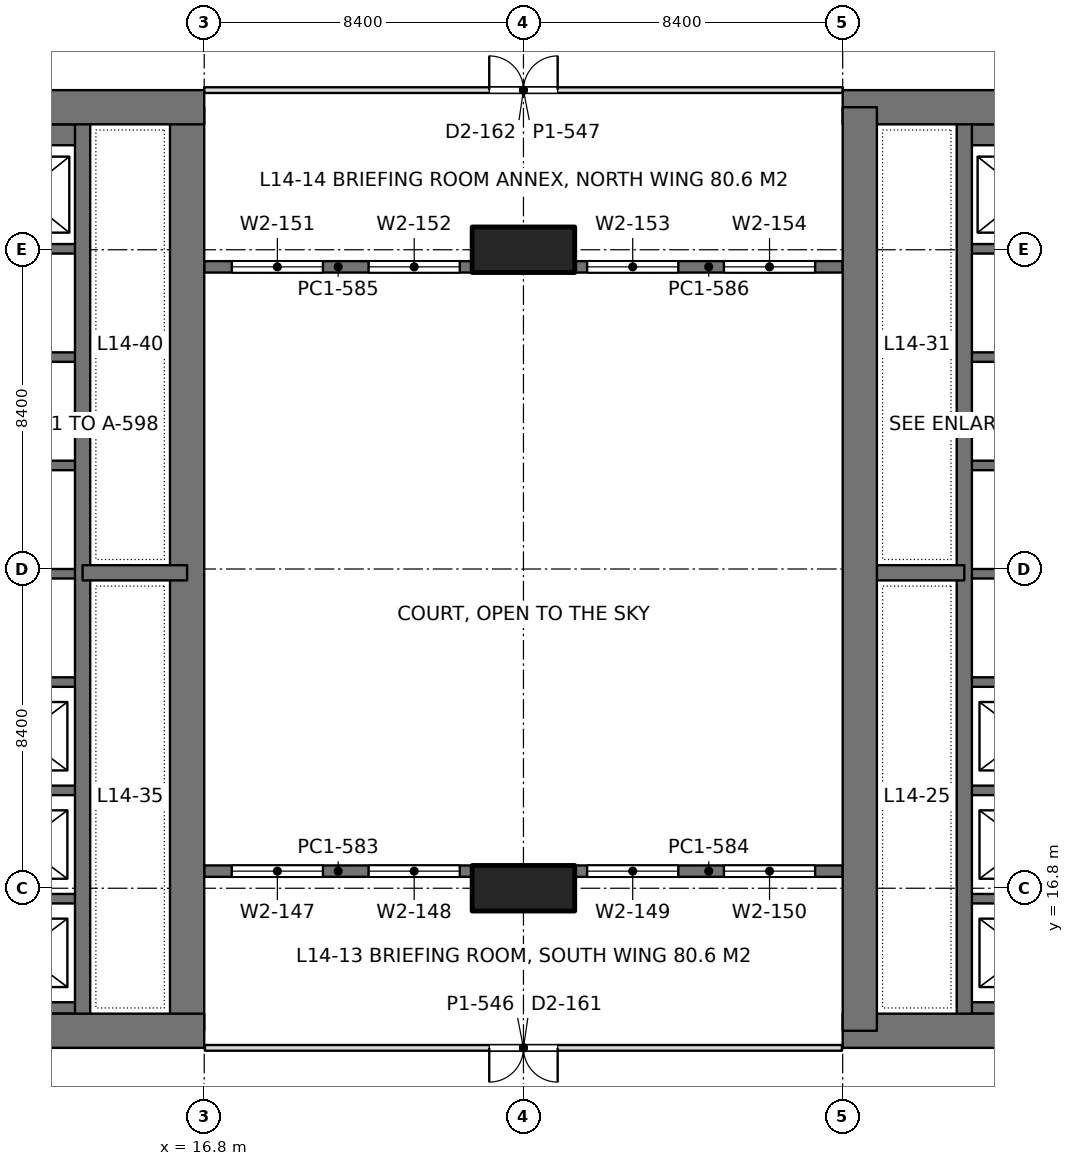
"""IFC4 building model, lengths in metres.
Left out: names, types, materials, properties, quantities, classifications, styles, units other than length and angle.
Written with IfcOpenShell. Run it as: python <this file> out.ifc"""

import sys

from ifc_helpers import new_model, si_unit, direction, frame, frame_2d, origin, origin_2d, place, context, subcontext, project, spatial, rectangle, extrude, element, fill, save


model = new_model("IFC4")
c1 = context("Model", 3, precision=1e-05, world=origin(), true_north=direction((0.0, 1.0)))
c2 = subcontext(c1, "Body", "Model", "MODEL_VIEW")
j1 = project(units=[si_unit("LENGTHUNIT", "METRE"), si_unit("PLANEANGLEUNIT", "RADIAN")], contexts=[c1])
p1 = place(None, origin())
s1 = spatial("IfcSite", under=j1, at=p1, CompositionType="ELEMENT")
p2 = place(p1, origin())
s2 = spatial("IfcBuilding", under=s1, at=p2, CompositionType="ELEMENT")
p3 = place(p2, frame((0.0, 0.0, 63.9)))
s3 = spatial("IfcBuildingStorey", under=s2, at=p3, CompositionType="ELEMENT", Elevation=63.9)
for number, where, z_axis, x_axis in (
    (1, (25.2, 16.8, 0.0), (0.0, 0.0, 1.0), (1.0, 0.0, 0.0)),
    (2, (25.2, 33.6, 0.0), (0.0, 0.0, 1.0), (1.0, 0.0, 0.0)),
):
    element("IfcColumn", number, at=place(p3, frame(where, z_axis=z_axis, x_axis=x_axis)), inside=s3, PredefinedType="COLUMN", context=c2, shape_type="SweptSolid", body=[
        extrude(rectangle(XDim=2.7, YDim=1.2, at=origin_2d()), origin(), (0.0, 0.0, 1.0), 4.5),
    ])
p4 = place(p3, frame((-1.2, 13.05, 0.0), z_axis=(0.0, 0.0, 1.0), x_axis=(1.0, 0.0, 0.0)))
e3 = element("IfcWall", 3, at=p4, inside=s3, PredefinedType="SHEAR", context=c2, shape_type="SweptSolid", body=[
    extrude(rectangle(XDim=18.0, YDim=0.9, at=frame_2d((9.0, 0.0))), origin(), (0.0, 0.0, 1.0), 4.5),
])
p5 = place(p4, frame((8.95, 0.0, 0.0)))
e4 = element("IfcOpeningElement", 4, at=p5, cuts=e3, PredefinedType="OPENING", context=c2, shape_type="SweptSolid", body=[
    extrude(rectangle(XDim=1.8, YDim=2.4, at=frame_2d((0.9, 1.2))), frame((0.0, 0.46, 0.0), z_axis=(0.0, -1.0, 0.0), x_axis=(1.0, 0.0, 0.0)), (0.0, 0.0, 1.0), 0.92),
])
p6 = place(p3, frame((-1.2, 37.35, 0.0), z_axis=(0.0, 0.0, 1.0), x_axis=(1.0, 0.0, 0.0)))
e5 = element("IfcWall", 5, at=p6, inside=s3, PredefinedType="SHEAR", context=c2, shape_type="SweptSolid", body=[
    extrude(rectangle(XDim=18.0, YDim=0.9, at=frame_2d((9.0, 0.0))), origin(), (0.0, 0.0, 1.0), 4.5),
])
p7 = place(p6, frame((8.95, 0.0, 0.0)))
e6 = element("IfcOpeningElement", 6, at=p7, cuts=e5, PredefinedType="OPENING", context=c2, shape_type="SweptSolid", body=[
    extrude(rectangle(XDim=1.8, YDim=2.4, at=frame_2d((0.9, 1.2))), frame((0.0, 0.46, 0.0), z_axis=(0.0, -1.0, 0.0), x_axis=(1.0, 0.0, 0.0)), (0.0, 0.0, 1.0), 0.92),
])
p8 = place(p3, frame((16.35, 13.05, 0.0), z_axis=(0.0, 0.0, 1.0), x_axis=(0.0, 1.0, 0.0)))
e7 = element("IfcWall", 7, at=p8, inside=s3, PredefinedType="SHEAR", context=c2, shape_type="SweptSolid", body=[
    extrude(rectangle(XDim=24.3, YDim=0.9, at=frame_2d((12.15, 0.0))), origin(), (0.0, 0.0, 1.0), 4.5),
])
p9 = place(p3, frame((13.6, 13.05, 0.0), z_axis=(0.0, 0.0, 1.0), x_axis=(0.0, 1.0, 0.0)))
e8 = element("IfcWall", 8, at=p9, inside=s3, PredefinedType="SHEAR", context=c2, shape_type="SweptSolid", body=[
    extrude(rectangle(XDim=24.3, YDim=0.4, at=frame_2d((12.15, 0.0))), origin(), (0.0, 0.0, 1.0), 4.5),
])
p10 = place(p3, frame((13.6, 25.1, 0.0), z_axis=(0.0, 0.0, 1.0), x_axis=(1.0, 0.0, 0.0)))
e9 = element("IfcWall", 9, at=p10, inside=s3, PredefinedType="SHEAR", context=c2, shape_type="SweptSolid", body=[
    extrude(rectangle(XDim=2.75, YDim=0.4, at=frame_2d((1.375, 0.0))), origin(), (0.0, 0.0, 1.0), 4.5),
])
p11 = place(p3, frame((10.4, 13.65, 0.0), z_axis=(0.0, 0.0, 1.0), x_axis=(1.0, 0.0, 0.0)))
e10 = element("IfcWall", 10, at=p11, inside=s3, PredefinedType="SHEAR", context=c2, shape_type="SweptSolid", body=[
    extrude(rectangle(XDim=3.2, YDim=0.3, at=frame_2d((1.6, 0.0))), origin(), (0.0, 0.0, 1.0), 4.5),
])
for number, where, z_axis, x_axis in (
    (11, (10.4, 16.525, 0.0), (0.0, 0.0, 1.0), (1.0, 0.0, 0.0)),
    (12, (10.4, 19.375, 0.0), (0.0, 0.0, 1.0), (1.0, 0.0, 0.0)),
    (13, (10.4, 22.225, 0.0), (0.0, 0.0, 1.0), (1.0, 0.0, 0.0)),
    (14, (10.4, 25.075, 0.0), (0.0, 0.0, 1.0), (1.0, 0.0, 0.0)),
    (15, (10.4, 27.925, 0.0), (0.0, 0.0, 1.0), (1.0, 0.0, 0.0)),
    (16, (10.4, 30.775, 0.0), (0.0, 0.0, 1.0), (1.0, 0.0, 0.0)),
    (17, (10.4, 33.625, 0.0), (0.0, 0.0, 1.0), (1.0, 0.0, 0.0)),
):
    element("IfcWall", number, at=place(p3, frame(where, z_axis=z_axis, x_axis=x_axis)), inside=s3, PredefinedType="SHEAR", context=c2, shape_type="SweptSolid", body=[
        extrude(rectangle(XDim=3.2, YDim=0.25, at=frame_2d((1.6, 0.0))), origin(), (0.0, 0.0, 1.0), 4.5),
    ])
p12 = place(p3, frame((10.4, 36.625, 0.0), z_axis=(0.0, 0.0, 1.0), x_axis=(1.0, 0.0, 0.0)))
e18 = element("IfcWall", 18, at=p12, inside=s3, PredefinedType="SHEAR", context=c2, shape_type="SweptSolid", body=[
    extrude(rectangle(XDim=3.2, YDim=0.55, at=frame_2d((1.6, 0.0))), origin(), (0.0, 0.0, 1.0), 4.5),
])
p13 = place(p3, frame((33.6, 13.05, 0.0), z_axis=(0.0, 0.0, 1.0), x_axis=(1.0, 0.0, 0.0)))
e19 = element("IfcWall", 19, at=p13, inside=s3, PredefinedType="SHEAR", context=c2, shape_type="SweptSolid", body=[
    extrude(rectangle(XDim=18.0, YDim=0.9, at=frame_2d((9.0, 0.0))), origin(), (0.0, 0.0, 1.0), 4.5),
])
p14 = place(p13, frame((7.25, 0.0, 0.0)))
e20 = element("IfcOpeningElement", 20, at=p14, cuts=e19, PredefinedType="OPENING", context=c2, shape_type="SweptSolid", body=[
    extrude(rectangle(XDim=1.8, YDim=2.4, at=frame_2d((0.9, 1.2))), frame((0.0, 0.46, 0.0), z_axis=(0.0, -1.0, 0.0), x_axis=(1.0, 0.0, 0.0)), (0.0, 0.0, 1.0), 0.92),
])
p15 = place(p3, frame((33.6, 37.35, 0.0), z_axis=(0.0, 0.0, 1.0), x_axis=(1.0, 0.0, 0.0)))
e21 = element("IfcWall", 21, at=p15, inside=s3, PredefinedType="SHEAR", context=c2, shape_type="SweptSolid", body=[
    extrude(rectangle(XDim=18.0, YDim=0.9, at=frame_2d((9.0, 0.0))), origin(), (0.0, 0.0, 1.0), 4.5),
])
p16 = place(p15, frame((7.25, 0.0, 0.0)))
e22 = element("IfcOpeningElement", 22, at=p16, cuts=e21, PredefinedType="OPENING", context=c2, shape_type="SweptSolid", body=[
    extrude(rectangle(XDim=1.8, YDim=2.4, at=frame_2d((0.9, 1.2))), frame((0.0, 0.46, 0.0), z_axis=(0.0, -1.0, 0.0), x_axis=(1.0, 0.0, 0.0)), (0.0, 0.0, 1.0), 0.92),
])
p17 = place(p3, frame((34.05, 13.05, 0.0), z_axis=(0.0, 0.0, 1.0), x_axis=(0.0, 1.0, 0.0)))
e23 = element("IfcWall", 23, at=p17, inside=s3, PredefinedType="SHEAR", context=c2, shape_type="SweptSolid", body=[
    extrude(rectangle(XDim=24.3, YDim=0.9, at=frame_2d((12.15, 0.0))), origin(), (0.0, 0.0, 1.0), 4.5),
])
p18 = place(p3, frame((36.8, 13.05, 0.0), z_axis=(0.0, 0.0, 1.0), x_axis=(0.0, 1.0, 0.0)))
e24 = element("IfcWall", 24, at=p18, inside=s3, PredefinedType="SHEAR", context=c2, shape_type="SweptSolid", body=[
    extrude(rectangle(XDim=24.3, YDim=0.4, at=frame_2d((12.15, 0.0))), origin(), (0.0, 0.0, 1.0), 4.5),
])
p19 = place(p3, frame((36.8, 25.1, 0.0), z_axis=(0.0, 0.0, 1.0), x_axis=(-1.0, 0.0, 0.0)))
e25 = element("IfcWall", 25, at=p19, inside=s3, PredefinedType="SHEAR", context=c2, shape_type="SweptSolid", body=[
    extrude(rectangle(XDim=2.75, YDim=0.4, at=frame_2d((1.375, 0.0))), origin(), (0.0, 0.0, 1.0), 4.5),
])
p20 = place(p3, frame((40.0, 13.65, 0.0), z_axis=(0.0, 0.0, 1.0), x_axis=(-1.0, 0.0, 0.0)))
e26 = element("IfcWall", 26, at=p20, inside=s3, PredefinedType="SHEAR", context=c2, shape_type="SweptSolid", body=[
    extrude(rectangle(XDim=3.2, YDim=0.3, at=frame_2d((1.6, 0.0))), origin(), (0.0, 0.0, 1.0), 4.5),
])
for number, where, z_axis, x_axis in (
    (27, (40.0, 16.525, 0.0), (0.0, 0.0, 1.0), (-1.0, 0.0, 0.0)),
    (28, (40.0, 19.375, 0.0), (0.0, 0.0, 1.0), (-1.0, 0.0, 0.0)),
    (29, (40.0, 22.225, 0.0), (0.0, 0.0, 1.0), (-1.0, 0.0, 0.0)),
    (30, (40.0, 25.075, 0.0), (0.0, 0.0, 1.0), (-1.0, 0.0, 0.0)),
    (31, (40.0, 27.925, 0.0), (0.0, 0.0, 1.0), (-1.0, 0.0, 0.0)),
    (32, (40.0, 30.775, 0.0), (0.0, 0.0, 1.0), (-1.0, 0.0, 0.0)),
    (33, (40.0, 33.625, 0.0), (0.0, 0.0, 1.0), (-1.0, 0.0, 0.0)),
):
    element("IfcWall", number, at=place(p3, frame(where, z_axis=z_axis, x_axis=x_axis)), inside=s3, PredefinedType="SHEAR", context=c2, shape_type="SweptSolid", body=[
        extrude(rectangle(XDim=3.2, YDim=0.25, at=frame_2d((1.6, 0.0))), origin(), (0.0, 0.0, 1.0), 4.5),
    ])
p21 = place(p3, frame((40.0, 36.625, 0.0), z_axis=(0.0, 0.0, 1.0), x_axis=(-1.0, 0.0, 0.0)))
e34 = element("IfcWall", 34, at=p21, inside=s3, PredefinedType="SHEAR", context=c2, shape_type="SweptSolid", body=[
    extrude(rectangle(XDim=3.2, YDim=0.55, at=frame_2d((1.6, 0.0))), origin(), (0.0, 0.0, 1.0), 4.5),
])
p22 = place(p3, frame((16.8, 17.25, 0.0), z_axis=(0.0, 0.0, 1.0), x_axis=(1.0, 0.0, 0.0)))
e35 = element("IfcWall", 35, at=p22, inside=s3, PredefinedType="SOLIDWALL", context=c2, shape_type="SweptSolid", body=[
    extrude(rectangle(XDim=7.05, YDim=0.3, at=frame_2d((3.525, 0.0))), origin(), (0.0, 0.0, 1.0), 4.34),
])
p23 = place(p22, frame((0.725, 0.0, 0.9)))
e36 = element("IfcOpeningElement", 36, at=p23, cuts=e35, PredefinedType="OPENING", context=c2, shape_type="SweptSolid", body=[
    extrude(rectangle(XDim=2.4, YDim=1.9, at=frame_2d((1.2, 0.95))), frame((0.0, 0.16, 0.0), z_axis=(0.0, -1.0, 0.0), x_axis=(1.0, 0.0, 0.0)), (0.0, 0.0, 1.0), 0.32),
])
p24 = place(p22, frame((4.325, 0.0, 0.9)))
e37 = element("IfcOpeningElement", 37, at=p24, cuts=e35, PredefinedType="OPENING", context=c2, shape_type="SweptSolid", body=[
    extrude(rectangle(XDim=2.4, YDim=1.9, at=frame_2d((1.2, 0.95))), frame((0.0, 0.16, 0.0), z_axis=(0.0, -1.0, 0.0), x_axis=(1.0, 0.0, 0.0)), (0.0, 0.0, 1.0), 0.32),
])
p25 = place(p3, frame((26.55, 17.25, 0.0), z_axis=(0.0, 0.0, 1.0), x_axis=(1.0, 0.0, 0.0)))
e38 = element("IfcWall", 38, at=p25, inside=s3, PredefinedType="SOLIDWALL", context=c2, shape_type="SweptSolid", body=[
    extrude(rectangle(XDim=7.05, YDim=0.3, at=frame_2d((3.525, 0.0))), origin(), (0.0, 0.0, 1.0), 4.34),
])
p26 = place(p25, frame((0.325, 0.0, 0.9)))
e39 = element("IfcOpeningElement", 39, at=p26, cuts=e38, PredefinedType="OPENING", context=c2, shape_type="SweptSolid", body=[
    extrude(rectangle(XDim=2.4, YDim=1.9, at=frame_2d((1.2, 0.95))), frame((0.0, 0.16, 0.0), z_axis=(0.0, -1.0, 0.0), x_axis=(1.0, 0.0, 0.0)), (0.0, 0.0, 1.0), 0.32),
])
p27 = place(p25, frame((3.925, 0.0, 0.9)))
e40 = element("IfcOpeningElement", 40, at=p27, cuts=e38, PredefinedType="OPENING", context=c2, shape_type="SweptSolid", body=[
    extrude(rectangle(XDim=2.4, YDim=1.9, at=frame_2d((1.2, 0.95))), frame((0.0, 0.16, 0.0), z_axis=(0.0, -1.0, 0.0), x_axis=(1.0, 0.0, 0.0)), (0.0, 0.0, 1.0), 0.32),
])
p28 = place(p3, frame((16.8, 33.15, 0.0), z_axis=(0.0, 0.0, 1.0), x_axis=(1.0, 0.0, 0.0)))
e41 = element("IfcWall", 41, at=p28, inside=s3, PredefinedType="SOLIDWALL", context=c2, shape_type="SweptSolid", body=[
    extrude(rectangle(XDim=7.05, YDim=0.3, at=frame_2d((3.525, 0.0))), origin(), (0.0, 0.0, 1.0), 4.34),
])
p29 = place(p28, frame((0.725, 0.0, 0.9)))
e42 = element("IfcOpeningElement", 42, at=p29, cuts=e41, PredefinedType="OPENING", context=c2, shape_type="SweptSolid", body=[
    extrude(rectangle(XDim=2.4, YDim=1.9, at=frame_2d((1.2, 0.95))), frame((0.0, 0.16, 0.0), z_axis=(0.0, -1.0, 0.0), x_axis=(1.0, 0.0, 0.0)), (0.0, 0.0, 1.0), 0.32),
])
p30 = place(p28, frame((4.325, 0.0, 0.9)))
e43 = element("IfcOpeningElement", 43, at=p30, cuts=e41, PredefinedType="OPENING", context=c2, shape_type="SweptSolid", body=[
    extrude(rectangle(XDim=2.4, YDim=1.9, at=frame_2d((1.2, 0.95))), frame((0.0, 0.16, 0.0), z_axis=(0.0, -1.0, 0.0), x_axis=(1.0, 0.0, 0.0)), (0.0, 0.0, 1.0), 0.32),
])
p31 = place(p3, frame((26.55, 33.15, 0.0), z_axis=(0.0, 0.0, 1.0), x_axis=(1.0, 0.0, 0.0)))
e44 = element("IfcWall", 44, at=p31, inside=s3, PredefinedType="SOLIDWALL", context=c2, shape_type="SweptSolid", body=[
    extrude(rectangle(XDim=7.05, YDim=0.3, at=frame_2d((3.525, 0.0))), origin(), (0.0, 0.0, 1.0), 4.34),
])
p32 = place(p31, frame((0.325, 0.0, 0.9)))
e45 = element("IfcOpeningElement", 45, at=p32, cuts=e44, PredefinedType="OPENING", context=c2, shape_type="SweptSolid", body=[
    extrude(rectangle(XDim=2.4, YDim=1.9, at=frame_2d((1.2, 0.95))), frame((0.0, 0.16, 0.0), z_axis=(0.0, -1.0, 0.0), x_axis=(1.0, 0.0, 0.0)), (0.0, 0.0, 1.0), 0.32),
])
p33 = place(p31, frame((3.925, 0.0, 0.9)))
e46 = element("IfcOpeningElement", 46, at=p33, cuts=e44, PredefinedType="OPENING", context=c2, shape_type="SweptSolid", body=[
    extrude(rectangle(XDim=2.4, YDim=1.9, at=frame_2d((1.2, 0.95))), frame((0.0, 0.16, 0.0), z_axis=(0.0, -1.0, 0.0), x_axis=(1.0, 0.0, 0.0)), (0.0, 0.0, 1.0), 0.32),
])
p34 = place(p3, frame((16.82, 12.6, 0.0), z_axis=(0.0, 0.0, 1.0), x_axis=(1.0, 0.0, 0.0)))
e47 = element("IfcWall", 47, at=p34, inside=s3, PredefinedType="PARTITIONING", context=c2, shape_type="SweptSolid", body=[
    extrude(rectangle(XDim=16.76, YDim=0.15, at=frame_2d((8.38, 0.0))), origin(), (0.0, 0.0, 1.0), 3.74),
])
p35 = place(p34, frame((7.48, 0.0, 0.0)))
e48 = element("IfcOpeningElement", 48, at=p35, cuts=e47, PredefinedType="OPENING", context=c2, shape_type="SweptSolid", body=[
    extrude(rectangle(XDim=1.8, YDim=2.2, at=frame_2d((0.9, 1.1))), frame((0.0, 0.085, 0.0), z_axis=(0.0, -1.0, 0.0), x_axis=(1.0, 0.0, 0.0)), (0.0, 0.0, 1.0), 0.17),
])
p36 = place(p3, frame((16.798, 37.8, 0.0), z_axis=(0.0, 0.0, 1.0), x_axis=(1.0, 0.0, 0.0)))
e49 = element("IfcWall", 49, at=p36, inside=s3, PredefinedType="PARTITIONING", context=c2, shape_type="SweptSolid", body=[
    extrude(rectangle(XDim=16.804, YDim=0.15, at=frame_2d((8.402, 0.0))), origin(), (0.0, 0.0, 1.0), 3.74),
])
p37 = place(p36, frame((7.502, 0.0, 0.0)))
e50 = element("IfcOpeningElement", 50, at=p37, cuts=e49, PredefinedType="OPENING", context=c2, shape_type="SweptSolid", body=[
    extrude(rectangle(XDim=1.8, YDim=2.2, at=frame_2d((0.9, 1.1))), frame((0.0, 0.085, 0.0), z_axis=(0.0, -1.0, 0.0), x_axis=(1.0, 0.0, 0.0)), (0.0, 0.0, 1.0), 0.17),
])
p38 = place(p23, origin())
e51 = element("IfcWindow", 51, at=p38, inside=s3, PartitioningType="SINGLE_PANEL", PredefinedType="WINDOW", context=c2, shape_type="SweptSolid", body=[
    extrude(rectangle(XDim=2.4, YDim=1.9, at=frame_2d((1.2, 0.95))), frame((0.0, 0.03, 0.0), z_axis=(0.0, -1.0, 0.0), x_axis=(1.0, 0.0, 0.0)), (0.0, 0.0, 1.0), 0.06),
])
fill(e36, e51)
p39 = place(p24, origin())
e52 = element("IfcWindow", 52, at=p39, inside=s3, PartitioningType="SINGLE_PANEL", PredefinedType="WINDOW", context=c2, shape_type="SweptSolid", body=[
    extrude(rectangle(XDim=2.4, YDim=1.9, at=frame_2d((1.2, 0.95))), frame((0.0, 0.03, 0.0), z_axis=(0.0, -1.0, 0.0), x_axis=(1.0, 0.0, 0.0)), (0.0, 0.0, 1.0), 0.06),
])
fill(e37, e52)
p40 = place(p26, origin())
e53 = element("IfcWindow", 53, at=p40, inside=s3, PartitioningType="SINGLE_PANEL", PredefinedType="WINDOW", context=c2, shape_type="SweptSolid", body=[
    extrude(rectangle(XDim=2.4, YDim=1.9, at=frame_2d((1.2, 0.95))), frame((0.0, 0.03, 0.0), z_axis=(0.0, -1.0, 0.0), x_axis=(1.0, 0.0, 0.0)), (0.0, 0.0, 1.0), 0.06),
])
fill(e39, e53)
p41 = place(p27, origin())
e54 = element("IfcWindow", 54, at=p41, inside=s3, PartitioningType="SINGLE_PANEL", PredefinedType="WINDOW", context=c2, shape_type="SweptSolid", body=[
    extrude(rectangle(XDim=2.4, YDim=1.9, at=frame_2d((1.2, 0.95))), frame((0.0, 0.03, 0.0), z_axis=(0.0, -1.0, 0.0), x_axis=(1.0, 0.0, 0.0)), (0.0, 0.0, 1.0), 0.06),
])
fill(e40, e54)
p42 = place(p29, origin())
e55 = element("IfcWindow", 55, at=p42, inside=s3, PartitioningType="SINGLE_PANEL", PredefinedType="WINDOW", context=c2, shape_type="SweptSolid", body=[
    extrude(rectangle(XDim=2.4, YDim=1.9, at=frame_2d((1.2, 0.95))), frame((0.0, 0.03, 0.0), z_axis=(0.0, -1.0, 0.0), x_axis=(1.0, 0.0, 0.0)), (0.0, 0.0, 1.0), 0.06),
])
fill(e42, e55)
p43 = place(p30, origin())
e56 = element("IfcWindow", 56, at=p43, inside=s3, PartitioningType="SINGLE_PANEL", PredefinedType="WINDOW", context=c2, shape_type="SweptSolid", body=[
    extrude(rectangle(XDim=2.4, YDim=1.9, at=frame_2d((1.2, 0.95))), frame((0.0, 0.03, 0.0), z_axis=(0.0, -1.0, 0.0), x_axis=(1.0, 0.0, 0.0)), (0.0, 0.0, 1.0), 0.06),
])
fill(e43, e56)
p44 = place(p32, origin())
e57 = element("IfcWindow", 57, at=p44, inside=s3, PartitioningType="SINGLE_PANEL", PredefinedType="WINDOW", context=c2, shape_type="SweptSolid", body=[
    extrude(rectangle(XDim=2.4, YDim=1.9, at=frame_2d((1.2, 0.95))), frame((0.0, 0.03, 0.0), z_axis=(0.0, -1.0, 0.0), x_axis=(1.0, 0.0, 0.0)), (0.0, 0.0, 1.0), 0.06),
])
fill(e45, e57)
p45 = place(p33, origin())
e58 = element("IfcWindow", 58, at=p45, inside=s3, PartitioningType="SINGLE_PANEL", PredefinedType="WINDOW", context=c2, shape_type="SweptSolid", body=[
    extrude(rectangle(XDim=2.4, YDim=1.9, at=frame_2d((1.2, 0.95))), frame((0.0, 0.03, 0.0), z_axis=(0.0, -1.0, 0.0), x_axis=(1.0, 0.0, 0.0)), (0.0, 0.0, 1.0), 0.06),
])
fill(e46, e58)
p46 = place(p35, frame((1.8, 0.0, 0.0), z_axis=(0.0, 0.0, 1.0), x_axis=(-1.0, 0.0, 0.0)))
e59 = element("IfcDoor", 59, at=p46, inside=s3, OperationType="DOUBLE_DOOR_SINGLE_SWING", PredefinedType="DOOR", context=c2, shape_type="SweptSolid", body=[
    extrude(rectangle(XDim=1.8, YDim=2.2, at=frame_2d((0.9, 1.1))), frame((0.0, 0.025, 0.0), z_axis=(0.0, -1.0, 0.0), x_axis=(1.0, 0.0, 0.0)), (0.0, 0.0, 1.0), 0.05),
])
fill(e48, e59)
p47 = place(p37, origin())
e60 = element("IfcDoor", 60, at=p47, inside=s3, OperationType="DOUBLE_DOOR_SINGLE_SWING", PredefinedType="DOOR", context=c2, shape_type="SweptSolid", body=[
    extrude(rectangle(XDim=1.8, YDim=2.2, at=frame_2d((0.9, 1.1))), frame((0.0, 0.025, 0.0), z_axis=(0.0, -1.0, 0.0), x_axis=(1.0, 0.0, 0.0)), (0.0, 0.0, 1.0), 0.05),
])
fill(e50, e60)
save(model, sys.argv[1])
